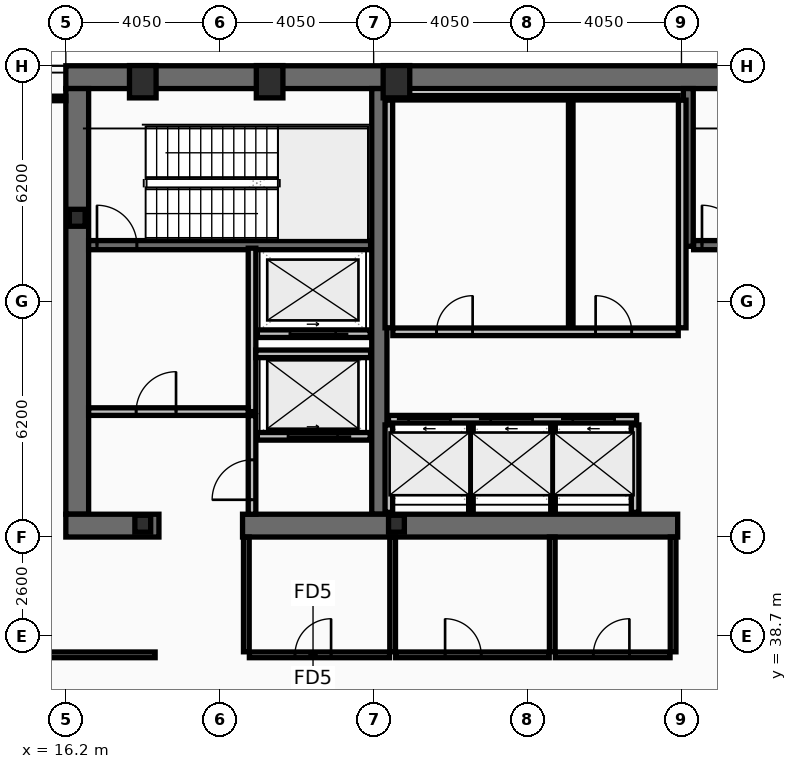
"""IFC4 building model, lengths in metres.
Left out: names, types, materials, properties, quantities, classifications, styles, units other than length and angle.
Written with IfcOpenShell. Run it as: python <this file> out.ifc"""

import sys

from ifc_helpers import new_model, si_unit, direction, frame, frame_2d, origin, origin_2d, place, context, subcontext, project, spatial, rectangle, hollow_rectangle, i_section, extrude, element, fill, save


model = new_model("IFC4")
c1 = context("Model", 3, precision=1e-05, world=origin(), true_north=direction((0.0, 1.0)))
c2 = subcontext(c1, "Body", "Model", "MODEL_VIEW")
j1 = project(units=[si_unit("LENGTHUNIT", "METRE"), si_unit("PLANEANGLEUNIT", "RADIAN")], contexts=[c1])
p1 = place(None, origin())
s1 = spatial("IfcSite", under=j1, at=p1, CompositionType="ELEMENT")
p2 = place(p1, origin())
s2 = spatial("IfcBuilding", under=s1, at=p2, CompositionType="ELEMENT")
p3 = place(p2, frame((0.0, 0.0, 184.2)))
s3 = spatial("IfcBuildingStorey", under=s2, at=p3, CompositionType="ELEMENT", Elevation=184.2)
p4 = place(p3, frame((16.2, 53.4, 0.0), z_axis=(0.0, 0.0, 1.0), x_axis=(1.0, 0.0, 0.0)))
e1 = element("IfcWall", 1, at=p4, inside=s3, PredefinedType="SHEAR", context=c2, shape_type="SweptSolid", body=[
    extrude(rectangle(XDim=40.5, YDim=0.6, at=frame_2d((20.25, 0.0))), origin(), (0.0, 0.0, 1.0), 4.24),
])
p5 = place(p3, frame((16.5, 41.9, 0.0), z_axis=(0.0, 0.0, 1.0), x_axis=(0.0, 1.0, 0.0)))
e2 = element("IfcWall", 2, at=p5, inside=s3, PredefinedType="SHEAR", context=c2, shape_type="SweptSolid", body=[
    extrude(rectangle(XDim=11.2, YDim=0.6, at=frame_2d((5.6, 0.0))), origin(), (0.0, 0.0, 1.0), 4.24),
])
p6 = place(p3, frame((24.45, 41.9, 0.0), z_axis=(0.0, 0.0, 1.0), x_axis=(0.0, 1.0, 0.0)))
e3 = element("IfcWall", 3, at=p6, inside=s3, PredefinedType="SHEAR", context=c2, shape_type="SweptSolid", body=[
    extrude(rectangle(XDim=11.2, YDim=0.4, at=frame_2d((5.6, 0.0))), origin(), (0.0, 0.0, 1.0), 4.24),
])
p7 = place(p3, frame((18.65, 41.6, 0.0), z_axis=(0.0, 0.0, 1.0), x_axis=(-1.0, 0.0, 0.0)))
e4 = element("IfcWall", 4, at=p7, inside=s3, PredefinedType="SHEAR", context=c2, shape_type="SweptSolid", body=[
    extrude(rectangle(XDim=2.45, YDim=0.6, at=frame_2d((1.225, 0.0))), origin(), (0.0, 0.0, 1.0), 4.24),
])
p8 = place(p3, frame((32.3, 41.6, 0.0), z_axis=(0.0, 0.0, 1.0), x_axis=(-1.0, 0.0, 0.0)))
e5 = element("IfcWall", 5, at=p8, inside=s3, PredefinedType="SHEAR", context=c2, shape_type="SweptSolid", body=[
    extrude(rectangle(XDim=11.45, YDim=0.6, at=frame_2d((5.725, 0.0))), origin(), (0.0, 0.0, 1.0), 4.24),
])
p9 = place(p3, frame((32.58, 48.95, 0.0), z_axis=(0.0, 0.0, 1.0), x_axis=(0.0, 1.0, 0.0)))
e6 = element("IfcWall", 6, at=p9, inside=s3, PredefinedType="SHEAR", context=c2, shape_type="SweptSolid", body=[
    extrude(rectangle(XDim=4.15, YDim=0.26, at=frame_2d((2.075, 0.0))), origin(), (0.0, 0.0, 1.0), 4.24),
])
p10 = place(p3, frame((16.8, 48.98, 0.0), z_axis=(0.0, 0.0, 1.0), x_axis=(1.0, 0.0, 0.0)))
e7 = element("IfcWall", 7, at=p10, inside=s3, PredefinedType="SHEAR", context=c2, shape_type="SweptSolid", body=[
    extrude(rectangle(XDim=7.42, YDim=0.24, at=frame_2d((3.71, 0.0))), origin(), (0.0, 0.0, 1.0), 4.24),
])
p11 = place(p10, frame((0.22, 0.0, 0.0)))
e8 = element("IfcOpeningElement", 8, at=p11, cuts=e7, PredefinedType="OPENING", context=c2, shape_type="SweptSolid", body=[
    extrude(rectangle(XDim=1.05, YDim=2.15, at=frame_2d((0.525, 1.075))), frame((0.0, 0.13, 0.0), z_axis=(0.0, -1.0, 0.0), x_axis=(1.0, 0.0, 0.0)), (0.0, 0.0, 1.0), 0.26),
])
p12 = place(p3, frame((32.72, 48.98, 0.0), z_axis=(0.0, 0.0, 1.0), x_axis=(1.0, 0.0, 0.0)))
e9 = element("IfcWall", 9, at=p12, inside=s3, PredefinedType="SHEAR", context=c2, shape_type="SweptSolid", body=[
    extrude(rectangle(XDim=7.56, YDim=0.24, at=frame_2d((3.78, 0.0))), origin(), (0.0, 0.0, 1.0), 4.24),
])
p13 = place(p12, frame((0.22, 0.0, 0.0)))
e10 = element("IfcOpeningElement", 10, at=p13, cuts=e9, PredefinedType="OPENING", context=c2, shape_type="SweptSolid", body=[
    extrude(rectangle(XDim=1.05, YDim=2.15, at=frame_2d((0.525, 1.075))), frame((0.0, 0.13, 0.0), z_axis=(0.0, -1.0, 0.0), x_axis=(1.0, 0.0, 0.0)), (0.0, 0.0, 1.0), 0.26),
])
for number, where, z_axis, x_axis in (
    (11, (18.225, 53.28, 0.0), (0.0, 0.0, 1.0), (1.0, 0.0, 0.0)),
    (12, (21.562, 53.28, 0.0), (0.0, 0.0, 1.0), (1.0, 0.0, 0.0)),
    (13, (24.9, 53.28, 0.0), (0.0, 0.0, 1.0), (1.0, 0.0, 0.0)),
):
    element("IfcColumn", number, at=place(p3, frame(where, z_axis=z_axis, x_axis=x_axis)), inside=s3, PredefinedType="COLUMN", context=c2, shape_type="SweptSolid", body=[
        extrude(hollow_rectangle(XDim=0.7, YDim=0.85, WallThickness=0.05, at=origin_2d()), origin(), (0.0, 0.0, 1.0), 4.4),
    ])
for number, where, z_axis, x_axis in (
    (14, (16.5, 49.7, 0.0), (0.0, 0.0, 1.0), (1.0, 0.0, 0.0)),
    (15, (18.225, 41.65, 0.0), (0.0, 0.0, 1.0), (1.0, 0.0, 0.0)),
    (16, (24.9, 41.65, 0.0), (0.0, 0.0, 1.0), (1.0, 0.0, 0.0)),
):
    element("IfcColumn", number, at=place(p3, frame(where, z_axis=z_axis, x_axis=x_axis)), inside=s3, PredefinedType="COLUMN", context=c2, shape_type="SweptSolid", body=[
        extrude(i_section(OverallWidth=0.416, OverallDepth=0.446, WebThickness=0.039, FlangeThickness=0.063, at=origin_2d()), origin(), (0.0, 0.0, 1.0), 4.4),
    ])
p14 = place(p3, frame((24.69, 44.4, 0.0), z_axis=(0.0, 0.0, 1.0), x_axis=(1.0, 0.0, 0.0)))
e17 = element("IfcWall", 17, at=p14, inside=s3, PredefinedType="PARTITIONING", context=c2, shape_type="SweptSolid", body=[
    extrude(rectangle(XDim=6.53, YDim=0.2, at=frame_2d((3.265, 0.0))), origin(), (0.0, 0.0, 1.0), 4.24),
])
p15 = place(p14, frame((0.53, 0.0, 0.0)))
e18 = element("IfcOpeningElement", 18, at=p15, cuts=e17, PredefinedType="OPENING", context=c2, shape_type="SweptSolid", body=[
    extrude(rectangle(XDim=1.1, YDim=2.18, at=frame_2d((0.55, 1.09))), frame((0.0, 0.11, 0.0), z_axis=(0.0, -1.0, 0.0), x_axis=(1.0, 0.0, 0.0)), (0.0, 0.0, 1.0), 0.22),
])
p16 = place(p14, frame((2.69, 0.0, 0.0)))
e19 = element("IfcOpeningElement", 19, at=p16, cuts=e17, PredefinedType="OPENING", context=c2, shape_type="SweptSolid", body=[
    extrude(rectangle(XDim=1.1, YDim=2.18, at=frame_2d((0.55, 1.09))), frame((0.0, 0.11, 0.0), z_axis=(0.0, -1.0, 0.0), x_axis=(1.0, 0.0, 0.0)), (0.0, 0.0, 1.0), 0.22),
])
p17 = place(p14, frame((4.85, 0.0, 0.0)))
e20 = element("IfcOpeningElement", 20, at=p17, cuts=e17, PredefinedType="OPENING", context=c2, shape_type="SweptSolid", body=[
    extrude(rectangle(XDim=1.1, YDim=2.18, at=frame_2d((0.55, 1.09))), frame((0.0, 0.11, 0.0), z_axis=(0.0, -1.0, 0.0), x_axis=(1.0, 0.0, 0.0)), (0.0, 0.0, 1.0), 0.22),
])
p18 = place(p3, frame((24.21, 43.95, 0.0), z_axis=(0.0, 0.0, 1.0), x_axis=(-1.0, 0.0, 0.0)))
e21 = element("IfcWall", 21, at=p18, inside=s3, PredefinedType="PARTITIONING", context=c2, shape_type="SweptSolid", body=[
    extrude(rectangle(XDim=2.97, YDim=0.2, at=frame_2d((1.485, 0.0))), origin(), (0.0, 0.0, 1.0), 4.24),
])
p19 = place(p18, frame((0.86, 0.0, 0.0)))
e22 = element("IfcOpeningElement", 22, at=p19, cuts=e21, PredefinedType="OPENING", context=c2, shape_type="SweptSolid", body=[
    extrude(rectangle(XDim=1.3, YDim=2.18, at=frame_2d((0.65, 1.09))), frame((0.0, 0.11, 0.0), z_axis=(0.0, -1.0, 0.0), x_axis=(1.0, 0.0, 0.0)), (0.0, 0.0, 1.0), 0.22),
])
p20 = place(p3, frame((24.21, 46.65, 0.0), z_axis=(0.0, 0.0, 1.0), x_axis=(-1.0, 0.0, 0.0)))
e23 = element("IfcWall", 23, at=p20, inside=s3, PredefinedType="PARTITIONING", context=c2, shape_type="SweptSolid", body=[
    extrude(rectangle(XDim=2.97, YDim=0.2, at=frame_2d((1.485, 0.0))), origin(), (0.0, 0.0, 1.0), 4.24),
])
p21 = place(p20, frame((0.91, 0.0, 0.0)))
e24 = element("IfcOpeningElement", 24, at=p21, cuts=e23, PredefinedType="OPENING", context=c2, shape_type="SweptSolid", body=[
    extrude(rectangle(XDim=1.2, YDim=2.18, at=frame_2d((0.6, 1.09))), frame((0.0, 0.11, 0.0), z_axis=(0.0, -1.0, 0.0), x_axis=(1.0, 0.0, 0.0)), (0.0, 0.0, 1.0), 0.22),
])
p22 = place(p3, frame((21.1, 44.6, 0.0), z_axis=(0.0, 0.0, 1.0), x_axis=(0.0, 1.0, 0.0)))
e25 = element("IfcWall", 25, at=p22, inside=s3, PredefinedType="PARTITIONING", context=c2, shape_type="SweptSolid", body=[
    extrude(rectangle(XDim=4.3, YDim=0.2, at=frame_2d((2.15, 0.0))), origin(), (0.0, 0.0, 1.0), 4.24),
])
p23 = place(p3, frame((16.8, 44.6, 0.0), z_axis=(0.0, 0.0, 1.0), x_axis=(1.0, 0.0, 0.0)))
e26 = element("IfcWall", 26, at=p23, inside=s3, PredefinedType="PARTITIONING", context=c2, shape_type="SweptSolid", body=[
    extrude(rectangle(XDim=4.2, YDim=0.2, at=frame_2d((2.1, 0.0))), origin(), (0.0, 0.0, 1.0), 4.24),
])
p24 = place(p23, frame((1.25, 0.0, 0.0)))
e27 = element("IfcOpeningElement", 27, at=p24, cuts=e26, PredefinedType="OPENING", context=c2, shape_type="SweptSolid", body=[
    extrude(rectangle(XDim=1.05, YDim=2.15, at=frame_2d((0.525, 1.075))), frame((0.0, 0.11, 0.0), z_axis=(0.0, -1.0, 0.0), x_axis=(1.0, 0.0, 0.0)), (0.0, 0.0, 1.0), 0.22),
])
p25 = place(p3, frame((21.2, 46.12, 0.0), z_axis=(0.0, 0.0, 1.0), x_axis=(1.0, 0.0, 0.0)))
e28 = element("IfcWall", 28, at=p25, inside=s3, PredefinedType="PARTITIONING", context=c2, shape_type="SweptSolid", body=[
    extrude(rectangle(XDim=3.02, YDim=0.2, at=frame_2d((1.51, 0.0))), origin(), (0.0, 0.0, 1.0), 4.24),
])
p26 = place(p3, frame((21.1, 41.9, 0.0), z_axis=(0.0, 0.0, 1.0), x_axis=(0.0, 1.0, 0.0)))
e29 = element("IfcWall", 29, at=p26, inside=s3, PredefinedType="PARTITIONING", context=c2, shape_type="SweptSolid", body=[
    extrude(rectangle(XDim=2.595, YDim=0.2, at=frame_2d((1.298, 0.0))), origin(), (0.0, 0.0, 1.0), 4.24),
])
p27 = place(p26, frame((0.38, 0.0, 0.0)))
e30 = element("IfcOpeningElement", 30, at=p27, cuts=e29, PredefinedType="OPENING", context=c2, shape_type="SweptSolid", body=[
    extrude(rectangle(XDim=1.05, YDim=2.15, at=frame_2d((0.525, 1.075))), frame((0.0, 0.11, 0.0), z_axis=(0.0, -1.0, 0.0), x_axis=(1.0, 0.0, 0.0)), (0.0, 0.0, 1.0), 0.22),
])
for number, where, z_axis, x_axis in (
    (31, (24.7, 46.805, 0.0), (0.0, 0.0, 1.0), (0.0, 1.0, 0.0)),
    (32, (32.42, 46.805, 0.0), (0.0, 0.0, 1.0), (0.0, 1.0, 0.0)),
):
    element("IfcWall", number, at=place(p3, frame(where, z_axis=z_axis, x_axis=x_axis)), inside=s3, PredefinedType="PARTITIONING", context=c2, shape_type="SweptSolid", body=[
        extrude(rectangle(XDim=5.99, YDim=0.2, at=frame_2d((2.995, 0.0))), origin(), (0.0, 0.0, 1.0), 4.24),
    ])
p28 = place(p3, frame((24.805, 52.86, 0.0), z_axis=(0.0, 0.0, 1.0), x_axis=(1.0, 0.0, 0.0)))
e33 = element("IfcWall", 33, at=p28, inside=s3, PredefinedType="PARTITIONING", context=c2, shape_type="SweptSolid", body=[
    extrude(rectangle(XDim=7.51, YDim=0.12, at=frame_2d((3.755, 0.0))), origin(), (0.0, 0.0, 1.0), 4.24),
])
p29 = place(p3, frame((29.486, 46.805, 0.0), z_axis=(0.0, 0.0, 1.0), x_axis=(0.0, 1.0, 0.0)))
e34 = element("IfcWall", 34, at=p29, inside=s3, PredefinedType="PARTITIONING", context=c2, shape_type="SweptSolid", body=[
    extrude(rectangle(XDim=5.99, YDim=0.12, at=frame_2d((2.995, 0.0))), origin(), (0.0, 0.0, 1.0), 4.24),
])
p30 = place(p3, frame((24.805, 46.7, 0.0), z_axis=(0.0, 0.0, 1.0), x_axis=(1.0, 0.0, 0.0)))
e35 = element("IfcWall", 35, at=p30, inside=s3, PredefinedType="PARTITIONING", context=c2, shape_type="SweptSolid", body=[
    extrude(rectangle(XDim=7.51, YDim=0.2, at=frame_2d((3.755, 0.0))), origin(), (0.0, 0.0, 1.0), 4.24),
])
p31 = place(p30, frame((1.15, 0.0, 0.0)))
e36 = element("IfcOpeningElement", 36, at=p31, cuts=e35, PredefinedType="OPENING", context=c2, shape_type="SweptSolid", body=[
    extrude(rectangle(XDim=0.95, YDim=2.1, at=frame_2d((0.475, 1.05))), frame((0.0, 0.11, 0.0), z_axis=(0.0, -1.0, 0.0), x_axis=(1.0, 0.0, 0.0)), (0.0, 0.0, 1.0), 0.22),
])
p32 = place(p30, frame((5.336, 0.0, 0.0)))
e37 = element("IfcOpeningElement", 37, at=p32, cuts=e35, PredefinedType="OPENING", context=c2, shape_type="SweptSolid", body=[
    extrude(rectangle(XDim=0.95, YDim=2.1, at=frame_2d((0.475, 1.05))), frame((0.0, 0.11, 0.0), z_axis=(0.0, -1.0, 0.0), x_axis=(1.0, 0.0, 0.0)), (0.0, 0.0, 1.0), 0.22),
])
for number, where, z_axis, x_axis in (
    (38, (24.7, 41.95, 0.0), (0.0, 0.0, 1.0), (0.0, 1.0, 0.0)),
    (39, (31.18, 41.95, 0.0), (0.0, 0.0, 1.0), (0.0, 1.0, 0.0)),
):
    element("IfcWall", number, at=place(p3, frame(where, z_axis=z_axis, x_axis=x_axis)), inside=s3, PredefinedType="PARTITIONING", context=c2, shape_type="SweptSolid", body=[
        extrude(rectangle(XDim=2.3, YDim=0.2, at=frame_2d((1.15, 0.0))), origin(), (0.0, 0.0, 1.0), 4.24),
    ])
for number, where, z_axis, x_axis in (
    (40, (26.86, 41.95, 0.0), (0.0, 0.0, 1.0), (0.0, 1.0, 0.0)),
    (41, (29.02, 41.95, 0.0), (0.0, 0.0, 1.0), (0.0, 1.0, 0.0)),
):
    element("IfcWall", number, at=place(p3, frame(where, z_axis=z_axis, x_axis=x_axis)), inside=s3, PredefinedType="PARTITIONING", context=c2, shape_type="SweptSolid", body=[
        extrude(rectangle(XDim=2.3, YDim=0.12, at=frame_2d((1.15, 0.0))), origin(), (0.0, 0.0, 1.0), 4.24),
    ])
p33 = place(p3, frame((21.03, 38.2, 0.0), z_axis=(0.0, 0.0, 1.0), x_axis=(1.0, 0.0, 0.0)))
e42 = element("IfcWall", 42, at=p33, inside=s3, PredefinedType="PARTITIONING", context=c2, shape_type="SweptSolid", body=[
    extrude(rectangle(XDim=3.69, YDim=0.15, at=frame_2d((1.845, 0.0))), origin(), (0.0, 0.0, 1.0), 3.53),
])
p34 = place(p33, frame((1.2, 0.0, 0.0)))
e43 = element("IfcOpeningElement", 43, at=p34, cuts=e42, PredefinedType="OPENING", context=c2, shape_type="SweptSolid", body=[
    extrude(rectangle(XDim=0.95, YDim=2.05, at=frame_2d((0.475, 1.025))), frame((0.0, 0.085, 0.0), z_axis=(0.0, -1.0, 0.0), x_axis=(1.0, 0.0, 0.0)), (0.0, 0.0, 1.0), 0.17),
])
p35 = place(p3, frame((24.88, 38.2, 0.0), z_axis=(0.0, 0.0, 1.0), x_axis=(1.0, 0.0, 0.0)))
e44 = element("IfcWall", 44, at=p35, inside=s3, PredefinedType="PARTITIONING", context=c2, shape_type="SweptSolid", body=[
    extrude(rectangle(XDim=4.04, YDim=0.15, at=frame_2d((2.02, 0.0))), origin(), (0.0, 0.0, 1.0), 3.53),
])
p36 = place(p35, frame((1.3, 0.0, 0.0)))
e45 = element("IfcOpeningElement", 45, at=p36, cuts=e44, PredefinedType="OPENING", context=c2, shape_type="SweptSolid", body=[
    extrude(rectangle(XDim=0.95, YDim=2.05, at=frame_2d((0.475, 1.025))), frame((0.0, 0.085, 0.0), z_axis=(0.0, -1.0, 0.0), x_axis=(1.0, 0.0, 0.0)), (0.0, 0.0, 1.0), 0.17),
])
p37 = place(p3, frame((29.08, 38.2, 0.0), z_axis=(0.0, 0.0, 1.0), x_axis=(1.0, 0.0, 0.0)))
e46 = element("IfcWall", 46, at=p37, inside=s3, PredefinedType="PARTITIONING", context=c2, shape_type="SweptSolid", body=[
    extrude(rectangle(XDim=3.02, YDim=0.15, at=frame_2d((1.51, 0.0))), origin(), (0.0, 0.0, 1.0), 3.53),
])
p38 = place(p37, frame((1.0, 0.0, 0.0)))
e47 = element("IfcOpeningElement", 47, at=p38, cuts=e46, PredefinedType="OPENING", context=c2, shape_type="SweptSolid", body=[
    extrude(rectangle(XDim=0.95, YDim=2.05, at=frame_2d((0.475, 1.025))), frame((0.0, 0.085, 0.0), z_axis=(0.0, -1.0, 0.0), x_axis=(1.0, 0.0, 0.0)), (0.0, 0.0, 1.0), 0.17),
])
p39 = place(p3, frame((20.95, 38.28, 0.0), z_axis=(0.0, 0.0, 1.0), x_axis=(0.0, 1.0, 0.0)))
e48 = element("IfcWall", 48, at=p39, inside=s3, PredefinedType="PARTITIONING", context=c2, shape_type="SweptSolid", body=[
    extrude(rectangle(XDim=3.02, YDim=0.15, at=frame_2d((1.51, 0.0))), origin(), (0.0, 0.0, 1.0), 4.24),
])
p40 = place(p3, frame((24.8, 38.28, 0.0), z_axis=(0.0, 0.0, 1.0), x_axis=(0.0, 1.0, 0.0)))
e49 = element("IfcWall", 49, at=p40, inside=s3, PredefinedType="PARTITIONING", context=c2, shape_type="SweptSolid", body=[
    extrude(rectangle(XDim=3.02, YDim=0.15, at=frame_2d((1.51, 0.0))), origin(), (0.0, 0.0, 1.0), 3.53),
])
for number, where, z_axis, x_axis in (
    (50, (29.0, 38.28, 0.0), (0.0, 0.0, 1.0), (0.0, 1.0, 0.0)),
    (51, (32.18, 38.28, 0.0), (0.0, 0.0, 1.0), (0.0, 1.0, 0.0)),
):
    element("IfcWall", number, at=place(p3, frame(where, z_axis=z_axis, x_axis=x_axis)), inside=s3, PredefinedType="PARTITIONING", context=c2, shape_type="SweptSolid", body=[
        extrude(rectangle(XDim=3.02, YDim=0.15, at=frame_2d((1.51, 0.0))), origin(), (0.0, 0.0, 1.0), 4.24),
    ])
p41 = place(p3, frame((6.03, 38.2, 0.0), z_axis=(0.0, 0.0, 1.0), x_axis=(1.0, 0.0, 0.0)))
e52 = element("IfcWall", 52, at=p41, inside=s3, PredefinedType="PARTITIONING", context=c2, shape_type="SweptSolid", body=[
    extrude(rectangle(XDim=12.52, YDim=0.15, at=frame_2d((6.26, 0.0))), origin(), (0.0, 0.0, 1.0), 3.53),
])
p42 = place(p41, frame((2.8, 0.0, 0.0)))
e53 = element("IfcOpeningElement", 53, at=p42, cuts=e52, PredefinedType="OPENING", context=c2, shape_type="SweptSolid", body=[
    extrude(rectangle(XDim=1.0, YDim=2.05, at=frame_2d((0.5, 1.025))), frame((0.0, 0.085, 0.0), z_axis=(0.0, -1.0, 0.0), x_axis=(1.0, 0.0, 0.0)), (0.0, 0.0, 1.0), 0.17),
])
p43 = place(p3, frame((6.095, 52.84, 0.0), z_axis=(0.0, 0.0, 1.0), x_axis=(1.0, 0.0, 0.0)))
e54 = element("IfcWall", 54, at=p43, inside=s3, PredefinedType="PARTITIONING", context=c2, shape_type="SweptSolid", body=[
    extrude(rectangle(XDim=10.105, YDim=0.12, at=frame_2d((5.052, 0.0))), origin(), (0.0, 0.0, 1.0), 4.24),
])
p44 = place(p11, origin())
e55 = element("IfcDoor", 55, at=p44, inside=s3, OperationType="SINGLE_SWING_LEFT", PredefinedType="DOOR", context=c2, shape_type="SweptSolid", body=[
    extrude(rectangle(XDim=1.05, YDim=2.15, at=frame_2d((0.525, 1.075))), frame((0.0, 0.025, 0.0), z_axis=(0.0, -1.0, 0.0), x_axis=(1.0, 0.0, 0.0)), (0.0, 0.0, 1.0), 0.05),
])
fill(e8, e55)
p45 = place(p13, origin())
e56 = element("IfcDoor", 56, at=p45, inside=s3, OperationType="SINGLE_SWING_LEFT", PredefinedType="DOOR", context=c2, shape_type="SweptSolid", body=[
    extrude(rectangle(XDim=1.05, YDim=2.15, at=frame_2d((0.525, 1.075))), frame((0.0, 0.025, 0.0), z_axis=(0.0, -1.0, 0.0), x_axis=(1.0, 0.0, 0.0)), (0.0, 0.0, 1.0), 0.05),
])
fill(e10, e56)
p46 = place(p15, origin())
e57 = element("IfcDoor", 57, at=p46, inside=s3, OperationType="SLIDING_TO_LEFT", PredefinedType="DOOR", context=c2, shape_type="SweptSolid", body=[
    extrude(rectangle(XDim=1.1, YDim=2.18, at=frame_2d((0.55, 1.09))), frame((0.0, 0.025, 0.0), z_axis=(0.0, -1.0, 0.0), x_axis=(1.0, 0.0, 0.0)), (0.0, 0.0, 1.0), 0.05),
])
fill(e18, e57)
p47 = place(p16, origin())
e58 = element("IfcDoor", 58, at=p47, inside=s3, OperationType="SLIDING_TO_LEFT", PredefinedType="DOOR", context=c2, shape_type="SweptSolid", body=[
    extrude(rectangle(XDim=1.1, YDim=2.18, at=frame_2d((0.55, 1.09))), frame((0.0, 0.025, 0.0), z_axis=(0.0, -1.0, 0.0), x_axis=(1.0, 0.0, 0.0)), (0.0, 0.0, 1.0), 0.05),
])
fill(e19, e58)
p48 = place(p17, origin())
e59 = element("IfcDoor", 59, at=p48, inside=s3, OperationType="SLIDING_TO_LEFT", PredefinedType="DOOR", context=c2, shape_type="SweptSolid", body=[
    extrude(rectangle(XDim=1.1, YDim=2.18, at=frame_2d((0.55, 1.09))), frame((0.0, 0.025, 0.0), z_axis=(0.0, -1.0, 0.0), x_axis=(1.0, 0.0, 0.0)), (0.0, 0.0, 1.0), 0.05),
])
fill(e20, e59)
p49 = place(p19, origin())
e60 = element("IfcDoor", 60, at=p49, inside=s3, OperationType="SLIDING_TO_LEFT", PredefinedType="DOOR", context=c2, shape_type="SweptSolid", body=[
    extrude(rectangle(XDim=1.3, YDim=2.18, at=frame_2d((0.65, 1.09))), frame((0.0, 0.025, 0.0), z_axis=(0.0, -1.0, 0.0), x_axis=(1.0, 0.0, 0.0)), (0.0, 0.0, 1.0), 0.05),
])
fill(e22, e60)
p50 = place(p21, origin())
e61 = element("IfcDoor", 61, at=p50, inside=s3, OperationType="SLIDING_TO_LEFT", PredefinedType="DOOR", context=c2, shape_type="SweptSolid", body=[
    extrude(rectangle(XDim=1.2, YDim=2.18, at=frame_2d((0.6, 1.09))), frame((0.0, 0.025, 0.0), z_axis=(0.0, -1.0, 0.0), x_axis=(1.0, 0.0, 0.0)), (0.0, 0.0, 1.0), 0.05),
])
fill(e24, e61)
p51 = place(p24, origin())
e62 = element("IfcDoor", 62, at=p51, inside=s3, OperationType="SINGLE_SWING_RIGHT", PredefinedType="DOOR", context=c2, shape_type="SweptSolid", body=[
    extrude(rectangle(XDim=1.05, YDim=2.15, at=frame_2d((0.525, 1.075))), frame((0.0, 0.025, 0.0), z_axis=(0.0, -1.0, 0.0), x_axis=(1.0, 0.0, 0.0)), (0.0, 0.0, 1.0), 0.05),
])
fill(e27, e62)
p52 = place(p27, origin())
e63 = element("IfcDoor", 63, at=p52, inside=s3, OperationType="SINGLE_SWING_LEFT", PredefinedType="DOOR", context=c2, shape_type="SweptSolid", body=[
    extrude(rectangle(XDim=1.05, YDim=2.15, at=frame_2d((0.525, 1.075))), frame((0.0, 0.025, 0.0), z_axis=(0.0, -1.0, 0.0), x_axis=(1.0, 0.0, 0.0)), (0.0, 0.0, 1.0), 0.05),
])
fill(e30, e63)
p53 = place(p31, origin())
e64 = element("IfcDoor", 64, at=p53, inside=s3, OperationType="SINGLE_SWING_RIGHT", PredefinedType="DOOR", context=c2, shape_type="SweptSolid", body=[
    extrude(rectangle(XDim=0.95, YDim=2.1, at=frame_2d((0.475, 1.05))), frame((0.0, 0.025, 0.0), z_axis=(0.0, -1.0, 0.0), x_axis=(1.0, 0.0, 0.0)), (0.0, 0.0, 1.0), 0.05),
])
fill(e36, e64)
p54 = place(p32, origin())
e65 = element("IfcDoor", 65, at=p54, inside=s3, OperationType="SINGLE_SWING_LEFT", PredefinedType="DOOR", context=c2, shape_type="SweptSolid", body=[
    extrude(rectangle(XDim=0.95, YDim=2.1, at=frame_2d((0.475, 1.05))), frame((0.0, 0.025, 0.0), z_axis=(0.0, -1.0, 0.0), x_axis=(1.0, 0.0, 0.0)), (0.0, 0.0, 1.0), 0.05),
])
fill(e37, e65)
p55 = place(p34, origin())
e66 = element("IfcDoor", 66, at=p55, inside=s3, OperationType="SINGLE_SWING_RIGHT", PredefinedType="DOOR", context=c2, shape_type="SweptSolid", body=[
    extrude(rectangle(XDim=0.95, YDim=2.05, at=frame_2d((0.475, 1.025))), frame((0.0, 0.025, 0.0), z_axis=(0.0, -1.0, 0.0), x_axis=(1.0, 0.0, 0.0)), (0.0, 0.0, 1.0), 0.05),
])
fill(e43, e66)
p56 = place(p36, origin())
e67 = element("IfcDoor", 67, at=p56, inside=s3, OperationType="SINGLE_SWING_LEFT", PredefinedType="DOOR", context=c2, shape_type="SweptSolid", body=[
    extrude(rectangle(XDim=0.95, YDim=2.05, at=frame_2d((0.475, 1.025))), frame((0.0, 0.025, 0.0), z_axis=(0.0, -1.0, 0.0), x_axis=(1.0, 0.0, 0.0)), (0.0, 0.0, 1.0), 0.05),
])
fill(e45, e67)
p57 = place(p38, origin())
e68 = element("IfcDoor", 68, at=p57, inside=s3, OperationType="SINGLE_SWING_RIGHT", PredefinedType="DOOR", context=c2, shape_type="SweptSolid", body=[
    extrude(rectangle(XDim=0.95, YDim=2.05, at=frame_2d((0.475, 1.025))), frame((0.0, 0.025, 0.0), z_axis=(0.0, -1.0, 0.0), x_axis=(1.0, 0.0, 0.0)), (0.0, 0.0, 1.0), 0.05),
])
fill(e47, e68)
save(model, sys.argv[1])
